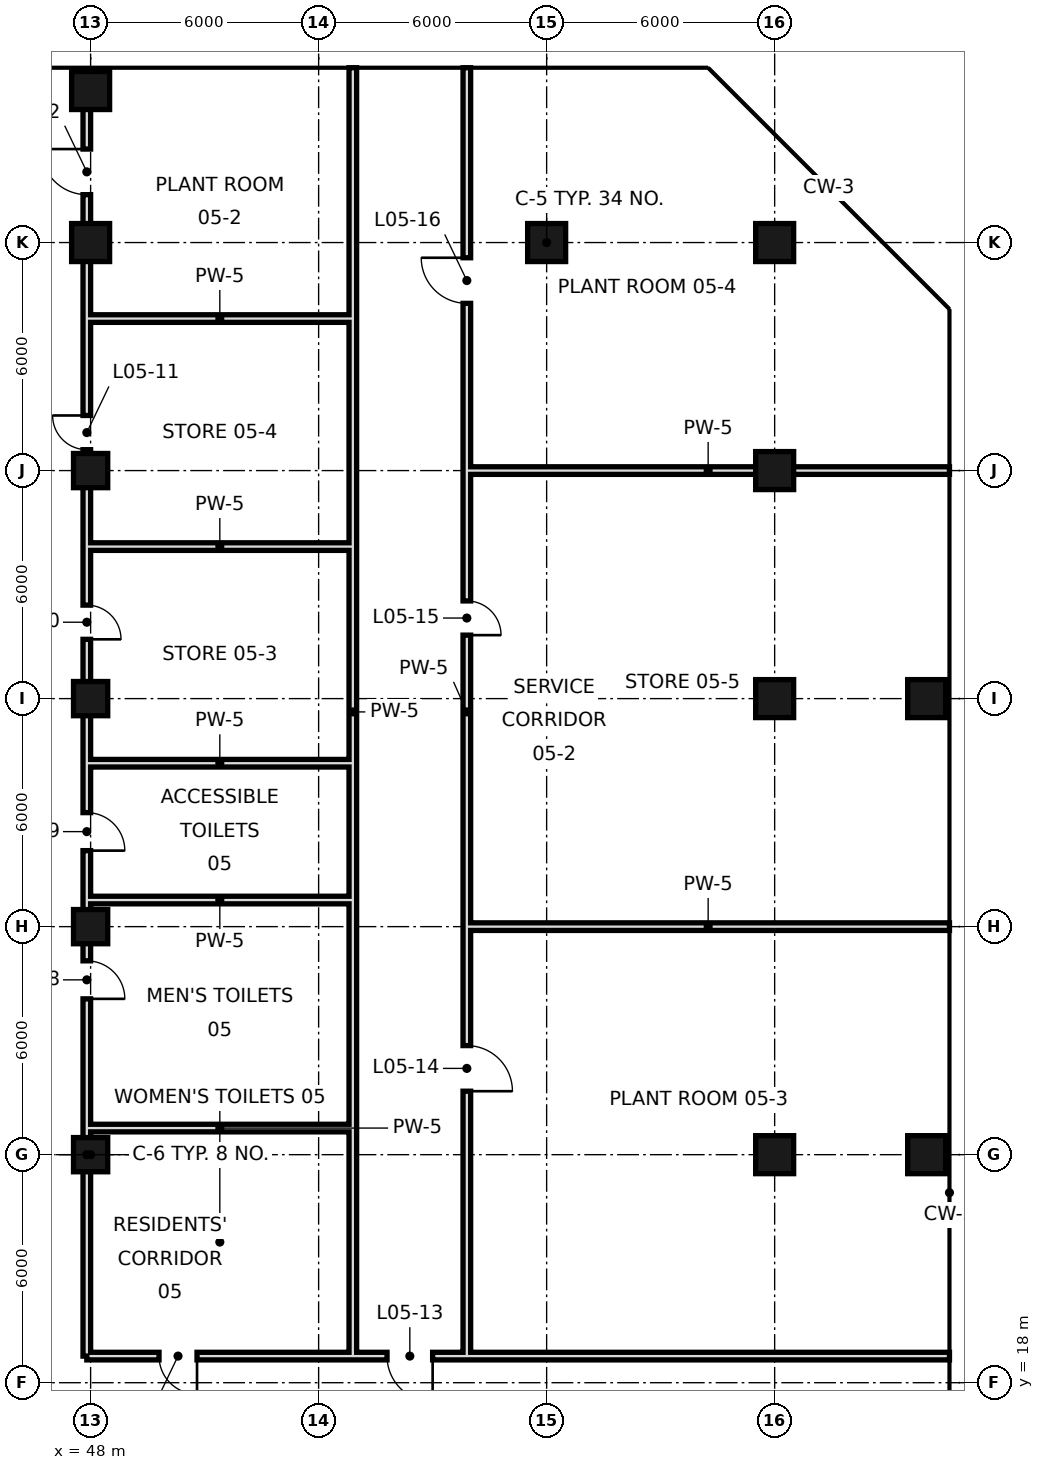
"""IFC4 building model, lengths in metres.
Left out: names, types, materials, properties, quantities, classifications, styles, units other than length and angle.
Written with IfcOpenShell. Run it as: python <this file> out.ifc"""

import sys

from ifc_helpers import new_model, si_unit, direction, frame, frame_2d, origin, origin_2d, place, context, subcontext, project, spatial, rectangle, hollow_rectangle, extrude, element, fill, save


model = new_model("IFC4")
c1 = context("Model", 3, precision=1e-05, world=origin(), true_north=direction((0.0, 1.0)))
c2 = subcontext(c1, "Body", "Model", "MODEL_VIEW")
j1 = project(units=[si_unit("LENGTHUNIT", "METRE"), si_unit("PLANEANGLEUNIT", "RADIAN")], contexts=[c1])
p1 = place(None, origin())
s1 = spatial("IfcSite", under=j1, at=p1, CompositionType="ELEMENT")
p2 = place(p1, origin())
s2 = spatial("IfcBuilding", under=s1, at=p2, CompositionType="ELEMENT")
p3 = place(p2, frame((0.0, 0.0, 34.8)))
s3 = spatial("IfcBuildingStorey", under=s2, at=p3, CompositionType="ELEMENT", Elevation=34.8)
for number, where, z_axis, x_axis in (
    (1, (48.0, 24.0, 0.0), (0.0, 0.0, 1.0), (1.0, 0.0, 0.0)),
    (2, (48.0, 30.0, 0.0), (0.0, 0.0, 1.0), (1.0, 0.0, 0.0)),
    (3, (48.0, 36.0, 0.0), (0.0, 0.0, 1.0), (1.0, 0.0, 0.0)),
    (4, (48.0, 42.0, 0.0), (0.0, 0.0, 1.0), (1.0, 0.0, 0.0)),
):
    element("IfcColumn", number, at=place(p3, frame(where, z_axis=z_axis, x_axis=x_axis)), inside=s3, PredefinedType="COLUMN", context=c2, shape_type="SweptSolid", body=[
        extrude(hollow_rectangle(XDim=0.9, YDim=0.9, WallThickness=0.045, at=origin_2d()), origin(), (0.0, 0.0, 1.0), 4.8),
    ])
for number, where, z_axis, x_axis in (
    (5, (48.0, 48.0, 0.0), (0.0, 0.0, 1.0), (1.0, 0.0, 0.0)),
    (6, (48.0, 52.0, 0.0), (0.0, 0.0, 1.0), (1.0, 0.0, 0.0)),
    (7, (60.0, 48.0, 0.0), (0.0, 0.0, 1.0), (1.0, 0.0, 0.0)),
    (8, (66.0, 24.0, 0.0), (0.0, 0.0, 1.0), (1.0, 0.0, 0.0)),
    (9, (66.0, 36.0, 0.0), (0.0, 0.0, 1.0), (1.0, 0.0, 0.0)),
    (10, (66.0, 42.0, 0.0), (0.0, 0.0, 1.0), (1.0, 0.0, 0.0)),
    (11, (66.0, 48.0, 0.0), (0.0, 0.0, 1.0), (1.0, 0.0, 0.0)),
    (12, (70.0, 24.0, 0.0), (0.0, 0.0, 1.0), (1.0, 0.0, 0.0)),
    (13, (70.0, 36.0, 0.0), (0.0, 0.0, 1.0), (1.0, 0.0, 0.0)),
):
    element("IfcColumn", number, at=place(p3, frame(where, z_axis=z_axis, x_axis=x_axis)), inside=s3, PredefinedType="COLUMN", context=c2, shape_type="SweptSolid", body=[
        extrude(hollow_rectangle(XDim=1.0, YDim=1.0, WallThickness=0.05, at=origin_2d()), origin(), (0.0, 0.0, 1.0), 4.8),
    ])
p4 = place(p3, frame((47.9, 18.7, 0.0), z_axis=(0.0, 0.0, 1.0), x_axis=(0.0, 1.0, 0.0)))
e14 = element("IfcWall", 14, at=p4, inside=s3, PredefinedType="SOLIDWALL", context=c2, shape_type="SweptSolid", body=[
    extrude(rectangle(XDim=33.3, YDim=0.2, at=frame_2d((16.65, 0.0))), origin(), (0.0, 0.0, 1.0), 3.7),
])
p5 = place(p4, frame((9.4, 0.0, 0.0)))
e15 = element("IfcOpeningElement", 15, at=p5, cuts=e14, PredefinedType="OPENING", context=c2, shape_type="SweptSolid", body=[
    extrude(rectangle(XDim=1.0, YDim=2.4, at=frame_2d((0.5, 1.2))), frame((0.0, 0.11, 0.0), z_axis=(0.0, -1.0, 0.0), x_axis=(1.0, 0.0, 0.0)), (0.0, 0.0, 1.0), 0.22),
])
p6 = place(p4, frame((13.3, 0.0, 0.0)))
e16 = element("IfcOpeningElement", 16, at=p6, cuts=e14, PredefinedType="OPENING", context=c2, shape_type="SweptSolid", body=[
    extrude(rectangle(XDim=1.0, YDim=2.4, at=frame_2d((0.5, 1.2))), frame((0.0, 0.11, 0.0), z_axis=(0.0, -1.0, 0.0), x_axis=(1.0, 0.0, 0.0)), (0.0, 0.0, 1.0), 0.22),
])
p7 = place(p4, frame((18.86, 0.0, 0.0)))
e17 = element("IfcOpeningElement", 17, at=p7, cuts=e14, PredefinedType="OPENING", context=c2, shape_type="SweptSolid", body=[
    extrude(rectangle(XDim=0.9, YDim=2.1, at=frame_2d((0.45, 1.05))), frame((0.0, 0.11, 0.0), z_axis=(0.0, -1.0, 0.0), x_axis=(1.0, 0.0, 0.0)), (0.0, 0.0, 1.0), 0.22),
])
p8 = place(p4, frame((23.85, 0.0, 0.0)))
e18 = element("IfcOpeningElement", 18, at=p8, cuts=e14, PredefinedType="OPENING", context=c2, shape_type="SweptSolid", body=[
    extrude(rectangle(XDim=0.9, YDim=2.1, at=frame_2d((0.45, 1.05))), frame((0.0, 0.11, 0.0), z_axis=(0.0, -1.0, 0.0), x_axis=(1.0, 0.0, 0.0)), (0.0, 0.0, 1.0), 0.22),
])
p9 = place(p4, frame((30.56, 0.0, 0.0)))
e19 = element("IfcOpeningElement", 19, at=p9, cuts=e14, PredefinedType="OPENING", context=c2, shape_type="SweptSolid", body=[
    extrude(rectangle(XDim=1.2, YDim=2.4, at=frame_2d((0.6, 1.2))), frame((0.0, 0.11, 0.0), z_axis=(0.0, -1.0, 0.0), x_axis=(1.0, 0.0, 0.0)), (0.0, 0.0, 1.0), 0.22),
])
p10 = place(p3, frame((54.9, 18.7, 0.0), z_axis=(0.0, 0.0, 1.0), x_axis=(0.0, 1.0, 0.0)))
e20 = element("IfcWall", 20, at=p10, inside=s3, PredefinedType="SOLIDWALL", context=c2, shape_type="SweptSolid", body=[
    extrude(rectangle(XDim=33.9, YDim=0.2, at=frame_2d((16.95, 0.0))), origin(), (0.0, 0.0, 1.0), 3.5),
])
p11 = place(p3, frame((57.9, 18.7, 0.0), z_axis=(0.0, 0.0, 1.0), x_axis=(0.0, 1.0, 0.0)))
e21 = element("IfcWall", 21, at=p11, inside=s3, PredefinedType="SOLIDWALL", context=c2, shape_type="SweptSolid", body=[
    extrude(rectangle(XDim=33.9, YDim=0.2, at=frame_2d((16.95, 0.0))), origin(), (0.0, 0.0, 1.0), 3.5),
])
p12 = place(p11, frame((6.97, 0.0, 0.0)))
e22 = element("IfcOpeningElement", 22, at=p12, cuts=e21, PredefinedType="OPENING", context=c2, shape_type="SweptSolid", body=[
    extrude(rectangle(XDim=1.2, YDim=2.4, at=frame_2d((0.6, 1.2))), frame((0.0, 0.11, 0.0), z_axis=(0.0, -1.0, 0.0), x_axis=(1.0, 0.0, 0.0)), (0.0, 0.0, 1.0), 0.22),
])
p13 = place(p11, frame((18.97, 0.0, 0.0)))
e23 = element("IfcOpeningElement", 23, at=p13, cuts=e21, PredefinedType="OPENING", context=c2, shape_type="SweptSolid", body=[
    extrude(rectangle(XDim=0.9, YDim=2.1, at=frame_2d((0.45, 1.05))), frame((0.0, 0.11, 0.0), z_axis=(0.0, -1.0, 0.0), x_axis=(1.0, 0.0, 0.0)), (0.0, 0.0, 1.0), 0.22),
])
p14 = place(p11, frame((27.7, 0.0, 0.0)))
e24 = element("IfcOpeningElement", 24, at=p14, cuts=e21, PredefinedType="OPENING", context=c2, shape_type="SweptSolid", body=[
    extrude(rectangle(XDim=1.2, YDim=2.4, at=frame_2d((0.6, 1.2))), frame((0.0, 0.11, 0.0), z_axis=(0.0, -1.0, 0.0), x_axis=(1.0, 0.0, 0.0)), (0.0, 0.0, 1.0), 0.22),
])
p15 = place(p3, frame((47.9, 18.7, 0.0), z_axis=(0.0, 0.0, 1.0), x_axis=(1.0, 0.0, 0.0)))
e25 = element("IfcWall", 25, at=p15, inside=s3, PredefinedType="SOLIDWALL", context=c2, shape_type="SweptSolid", body=[
    extrude(rectangle(XDim=22.7, YDim=0.2, at=frame_2d((11.35, 0.0))), origin(), (0.0, 0.0, 1.0), 3.7),
])
p16 = place(p15, frame((1.9, 0.0, 0.0)))
e26 = element("IfcOpeningElement", 26, at=p16, cuts=e25, PredefinedType="OPENING", context=c2, shape_type="SweptSolid", body=[
    extrude(rectangle(XDim=1.0, YDim=2.4, at=frame_2d((0.5, 1.2))), frame((0.0, 0.11, 0.0), z_axis=(0.0, -1.0, 0.0), x_axis=(1.0, 0.0, 0.0)), (0.0, 0.0, 1.0), 0.22),
])
p17 = place(p15, frame((7.9, 0.0, 0.0)))
e27 = element("IfcOpeningElement", 27, at=p17, cuts=e25, PredefinedType="OPENING", context=c2, shape_type="SweptSolid", body=[
    extrude(rectangle(XDim=1.2, YDim=2.4, at=frame_2d((0.6, 1.2))), frame((0.0, 0.11, 0.0), z_axis=(0.0, -1.0, 0.0), x_axis=(1.0, 0.0, 0.0)), (0.0, 0.0, 1.0), 0.22),
])
p18 = place(p3, frame((47.9, 24.7, 0.0), z_axis=(0.0, 0.0, 1.0), x_axis=(1.0, 0.0, 0.0)))
e28 = element("IfcWall", 28, at=p18, inside=s3, PredefinedType="SOLIDWALL", context=c2, shape_type="SweptSolid", body=[
    extrude(rectangle(XDim=7.0, YDim=0.2, at=frame_2d((3.5, 0.0))), origin(), (0.0, 0.0, 1.0), 3.95),
])
p19 = place(p3, frame((57.9, 30.0, 0.0), z_axis=(0.0, 0.0, 1.0), x_axis=(1.0, 0.0, 0.0)))
e29 = element("IfcWall", 29, at=p19, inside=s3, PredefinedType="SOLIDWALL", context=c2, shape_type="SweptSolid", body=[
    extrude(rectangle(XDim=12.7, YDim=0.2, at=frame_2d((6.35, 0.0))), origin(), (0.0, 0.0, 1.0), 3.5),
])
for number, where, z_axis, x_axis in (
    (30, (47.9, 30.7, 0.0), (0.0, 0.0, 1.0), (1.0, 0.0, 0.0)),
    (31, (47.9, 34.3, 0.0), (0.0, 0.0, 1.0), (1.0, 0.0, 0.0)),
    (32, (47.9, 40.0, 0.0), (0.0, 0.0, 1.0), (1.0, 0.0, 0.0)),
):
    element("IfcWall", number, at=place(p3, frame(where, z_axis=z_axis, x_axis=x_axis)), inside=s3, PredefinedType="SOLIDWALL", context=c2, shape_type="SweptSolid", body=[
        extrude(rectangle(XDim=7.0, YDim=0.2, at=frame_2d((3.5, 0.0))), origin(), (0.0, 0.0, 1.0), 3.95),
    ])
p20 = place(p3, frame((57.9, 42.0, 0.0), z_axis=(0.0, 0.0, 1.0), x_axis=(1.0, 0.0, 0.0)))
e33 = element("IfcWall", 33, at=p20, inside=s3, PredefinedType="SOLIDWALL", context=c2, shape_type="SweptSolid", body=[
    extrude(rectangle(XDim=12.7, YDim=0.2, at=frame_2d((6.35, 0.0))), origin(), (0.0, 0.0, 1.0), 3.5),
])
p21 = place(p3, frame((47.9, 46.0, 0.0), z_axis=(0.0, 0.0, 1.0), x_axis=(1.0, 0.0, 0.0)))
e34 = element("IfcWall", 34, at=p21, inside=s3, PredefinedType="SOLIDWALL", context=c2, shape_type="SweptSolid", body=[
    extrude(rectangle(XDim=7.0, YDim=0.2, at=frame_2d((3.5, 0.0))), origin(), (0.0, 0.0, 1.0), 3.95),
])
p22 = place(p16, origin())
e35 = element("IfcDoor", 35, at=p22, inside=s3, OperationType="SINGLE_SWING_RIGHT", PredefinedType="DOOR", context=c2, shape_type="SweptSolid", body=[
    extrude(rectangle(XDim=1.0, YDim=2.4, at=frame_2d((0.5, 1.2))), frame((0.0, 0.025, 0.0), z_axis=(0.0, -1.0, 0.0), x_axis=(1.0, 0.0, 0.0)), (0.0, 0.0, 1.0), 0.05),
])
fill(e26, e35)
p23 = place(p5, frame((1.0, 0.0, 0.0), z_axis=(0.0, 0.0, 1.0), x_axis=(-1.0, 0.0, 0.0)))
e36 = element("IfcDoor", 36, at=p23, inside=s3, OperationType="SINGLE_SWING_RIGHT", PredefinedType="DOOR", context=c2, shape_type="SweptSolid", body=[
    extrude(rectangle(XDim=1.0, YDim=2.4, at=frame_2d((0.5, 1.2))), frame((0.0, 0.025, 0.0), z_axis=(0.0, -1.0, 0.0), x_axis=(1.0, 0.0, 0.0)), (0.0, 0.0, 1.0), 0.05),
])
fill(e15, e36)
p24 = place(p6, frame((1.0, 0.0, 0.0), z_axis=(0.0, 0.0, 1.0), x_axis=(-1.0, 0.0, 0.0)))
e37 = element("IfcDoor", 37, at=p24, inside=s3, OperationType="SINGLE_SWING_RIGHT", PredefinedType="DOOR", context=c2, shape_type="SweptSolid", body=[
    extrude(rectangle(XDim=1.0, YDim=2.4, at=frame_2d((0.5, 1.2))), frame((0.0, 0.025, 0.0), z_axis=(0.0, -1.0, 0.0), x_axis=(1.0, 0.0, 0.0)), (0.0, 0.0, 1.0), 0.05),
])
fill(e16, e37)
p25 = place(p7, frame((0.9, 0.0, 0.0), z_axis=(0.0, 0.0, 1.0), x_axis=(-1.0, 0.0, 0.0)))
e38 = element("IfcDoor", 38, at=p25, inside=s3, OperationType="SINGLE_SWING_RIGHT", PredefinedType="DOOR", context=c2, shape_type="SweptSolid", body=[
    extrude(rectangle(XDim=0.9, YDim=2.1, at=frame_2d((0.45, 1.05))), frame((0.0, 0.025, 0.0), z_axis=(0.0, -1.0, 0.0), x_axis=(1.0, 0.0, 0.0)), (0.0, 0.0, 1.0), 0.05),
])
fill(e17, e38)
p26 = place(p8, frame((0.9, 0.0, 0.0), z_axis=(0.0, 0.0, 1.0), x_axis=(-1.0, 0.0, 0.0)))
e39 = element("IfcDoor", 39, at=p26, inside=s3, OperationType="SINGLE_SWING_LEFT", PredefinedType="DOOR", context=c2, shape_type="SweptSolid", body=[
    extrude(rectangle(XDim=0.9, YDim=2.1, at=frame_2d((0.45, 1.05))), frame((0.0, 0.025, 0.0), z_axis=(0.0, -1.0, 0.0), x_axis=(1.0, 0.0, 0.0)), (0.0, 0.0, 1.0), 0.05),
])
fill(e18, e39)
p27 = place(p9, frame((1.2, 0.0, 0.0), z_axis=(0.0, 0.0, 1.0), x_axis=(-1.0, 0.0, 0.0)))
e40 = element("IfcDoor", 40, at=p27, inside=s3, OperationType="SINGLE_SWING_LEFT", PredefinedType="DOOR", context=c2, shape_type="SweptSolid", body=[
    extrude(rectangle(XDim=1.2, YDim=2.4, at=frame_2d((0.6, 1.2))), frame((0.0, 0.025, 0.0), z_axis=(0.0, -1.0, 0.0), x_axis=(1.0, 0.0, 0.0)), (0.0, 0.0, 1.0), 0.05),
])
fill(e19, e40)
p28 = place(p17, origin())
e41 = element("IfcDoor", 41, at=p28, inside=s3, OperationType="SINGLE_SWING_RIGHT", PredefinedType="DOOR", context=c2, shape_type="SweptSolid", body=[
    extrude(rectangle(XDim=1.2, YDim=2.4, at=frame_2d((0.6, 1.2))), frame((0.0, 0.025, 0.0), z_axis=(0.0, -1.0, 0.0), x_axis=(1.0, 0.0, 0.0)), (0.0, 0.0, 1.0), 0.05),
])
fill(e27, e41)
p29 = place(p12, frame((1.2, 0.0, 0.0), z_axis=(0.0, 0.0, 1.0), x_axis=(-1.0, 0.0, 0.0)))
e42 = element("IfcDoor", 42, at=p29, inside=s3, OperationType="SINGLE_SWING_RIGHT", PredefinedType="DOOR", context=c2, shape_type="SweptSolid", body=[
    extrude(rectangle(XDim=1.2, YDim=2.4, at=frame_2d((0.6, 1.2))), frame((0.0, 0.025, 0.0), z_axis=(0.0, -1.0, 0.0), x_axis=(1.0, 0.0, 0.0)), (0.0, 0.0, 1.0), 0.05),
])
fill(e22, e42)
p30 = place(p13, frame((0.9, 0.0, 0.0), z_axis=(0.0, 0.0, 1.0), x_axis=(-1.0, 0.0, 0.0)))
e43 = element("IfcDoor", 43, at=p30, inside=s3, OperationType="SINGLE_SWING_RIGHT", PredefinedType="DOOR", context=c2, shape_type="SweptSolid", body=[
    extrude(rectangle(XDim=0.9, YDim=2.1, at=frame_2d((0.45, 1.05))), frame((0.0, 0.025, 0.0), z_axis=(0.0, -1.0, 0.0), x_axis=(1.0, 0.0, 0.0)), (0.0, 0.0, 1.0), 0.05),
])
fill(e23, e43)
p31 = place(p14, frame((1.2, 0.0, 0.0), z_axis=(0.0, 0.0, 1.0), x_axis=(-1.0, 0.0, 0.0)))
e44 = element("IfcDoor", 44, at=p31, inside=s3, OperationType="SINGLE_SWING_LEFT", PredefinedType="DOOR", context=c2, shape_type="SweptSolid", body=[
    extrude(rectangle(XDim=1.2, YDim=2.4, at=frame_2d((0.6, 1.2))), frame((0.0, 0.025, 0.0), z_axis=(0.0, -1.0, 0.0), x_axis=(1.0, 0.0, 0.0)), (0.0, 0.0, 1.0), 0.05),
])
fill(e24, e44)
save(model, sys.argv[1])
